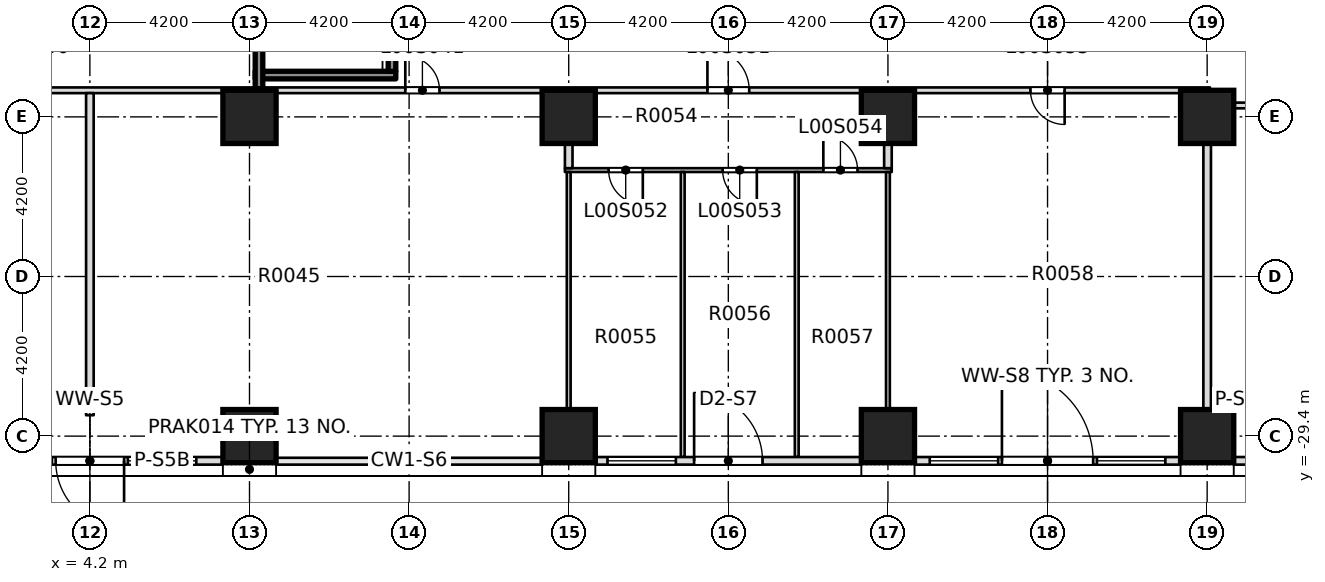
"""IFC4 building model, lengths in metres.
Left out: names, types, materials, properties, quantities, classifications, styles, units other than length and angle.
Written with IfcOpenShell. Run it as: python <this file> out.ifc"""

import sys

from ifc_helpers import new_model, si_unit, direction, frame, frame_2d, origin, origin_2d, place, context, subcontext, project, spatial, rectangle, extrude, element, fill, save


model = new_model("IFC4")
c1 = context("Model", 3, precision=1e-05, world=origin(), true_north=direction((0.0, 1.0)))
c2 = subcontext(c1, "Body", "Model", "MODEL_VIEW")
j1 = project(units=[si_unit("LENGTHUNIT", "METRE"), si_unit("PLANEANGLEUNIT", "RADIAN")], contexts=[c1])
p1 = place(None, origin())
s1 = spatial("IfcSite", under=j1, at=p1, CompositionType="ELEMENT")
p2 = place(p1, origin())
s2 = spatial("IfcBuilding", under=s1, at=p2, CompositionType="ELEMENT")
p3 = place(p2, origin())
s3 = spatial("IfcBuildingStorey", under=s2, at=p3, CompositionType="ELEMENT", Elevation=0.0)
for number, where, z_axis, x_axis in (
    (1, (8.4, -21.0, -0.45), (0.0, 0.0, 1.0), (1.0, 0.0, 0.0)),
    (2, (16.8, -21.0, -0.45), (0.0, 0.0, 1.0), (1.0, 0.0, 0.0)),
):
    element("IfcColumn", number, at=place(p3, frame(where, z_axis=z_axis, x_axis=x_axis)), inside=s3, PredefinedType="COLUMN", context=c2, shape_type="SweptSolid", body=[
        extrude(rectangle(XDim=1.4, YDim=1.4, at=origin_2d()), origin(), (0.0, 0.0, 1.0), 7.55),
    ])
for number, where, z_axis, x_axis in (
    (3, (8.4, -29.4, 0.0), (0.0, 0.0, 1.0), (1.0, 0.0, 0.0)),
    (4, (16.8, -29.4, 0.0), (0.0, 0.0, 1.0), (1.0, 0.0, 0.0)),
    (5, (25.2, -29.4, 0.0), (0.0, 0.0, 1.0), (1.0, 0.0, 0.0)),
    (6, (33.6, -29.4, 0.0), (0.0, 0.0, 1.0), (1.0, 0.0, 0.0)),
    (7, (25.2, -21.0, 0.0), (0.0, 0.0, 1.0), (1.0, 0.0, 0.0)),
    (8, (33.6, -21.0, 0.0), (0.0, 0.0, 1.0), (1.0, 0.0, 0.0)),
):
    element("IfcColumn", number, at=place(p3, frame(where, z_axis=z_axis, x_axis=x_axis)), inside=s3, PredefinedType="COLUMN", context=c2, shape_type="SweptSolid", body=[
        extrude(rectangle(XDim=1.4, YDim=1.4, at=origin_2d()), origin(), (0.0, 0.0, 1.0), 7.5),
    ])
p4 = place(p3, frame((16.7, -22.4, 0.0), z_axis=(0.0, 0.0, 1.0), x_axis=(1.0, 0.0, 0.0)))
e9 = element("IfcWall", 9, at=p4, inside=s3, PredefinedType="PARTITIONING", context=c2, shape_type="SweptSolid", body=[
    extrude(rectangle(XDim=8.6, YDim=0.1, at=frame_2d((4.3, 0.0))), origin(), (0.0, 0.0, 1.0), 7.1),
])
p5 = place(p4, frame((1.15, 0.0, 0.0)))
e10 = element("IfcOpeningElement", 10, at=p5, cuts=e9, PredefinedType="OPENING", context=c2, shape_type="SweptSolid", body=[
    extrude(rectangle(XDim=0.9, YDim=2.1, at=frame_2d((0.45, 1.05))), frame((0.0, 0.06, 0.0), z_axis=(0.0, -1.0, 0.0), x_axis=(1.0, 0.0, 0.0)), (0.0, 0.0, 1.0), 0.12),
])
p6 = place(p4, frame((4.15, 0.0, 0.0)))
e11 = element("IfcOpeningElement", 11, at=p6, cuts=e9, PredefinedType="OPENING", context=c2, shape_type="SweptSolid", body=[
    extrude(rectangle(XDim=0.9, YDim=2.1, at=frame_2d((0.45, 1.05))), frame((0.0, 0.06, 0.0), z_axis=(0.0, -1.0, 0.0), x_axis=(1.0, 0.0, 0.0)), (0.0, 0.0, 1.0), 0.12),
])
p7 = place(p4, frame((6.8, 0.0, 0.0)))
e12 = element("IfcOpeningElement", 12, at=p7, cuts=e9, PredefinedType="OPENING", context=c2, shape_type="SweptSolid", body=[
    extrude(rectangle(XDim=0.9, YDim=2.1, at=frame_2d((0.45, 1.05))), frame((0.0, 0.06, 0.0), z_axis=(0.0, -1.0, 0.0), x_axis=(1.0, 0.0, 0.0)), (0.0, 0.0, 1.0), 0.12),
])
p8 = place(p3, frame((33.5, -20.7, 0.0), z_axis=(0.0, 0.0, 1.0), x_axis=(1.0, 0.0, 0.0)))
e13 = element("IfcWall", 13, at=p8, inside=s3, PredefinedType="PARTITIONING", context=c2, shape_type="SweptSolid", body=[
    extrude(rectangle(XDim=16.975, YDim=0.15, at=frame_2d((8.488, 0.0))), origin(), (0.0, 0.0, 1.0), 7.1),
])
p9 = place(p8, frame((9.3, 0.0, 0.0)))
e14 = element("IfcOpeningElement", 14, at=p9, cuts=e13, PredefinedType="OPENING", context=c2, shape_type="SweptSolid", body=[
    extrude(rectangle(XDim=0.9, YDim=2.1, at=frame_2d((0.45, 1.05))), frame((0.0, 0.085, 0.0), z_axis=(0.0, -1.0, 0.0), x_axis=(1.0, 0.0, 0.0)), (0.0, 0.0, 1.0), 0.17),
])
p10 = place(p3, frame((-34.15, -20.3, 0.0), z_axis=(0.0, 0.0, 1.0), x_axis=(1.0, 0.0, 0.0)))
e15 = element("IfcWall", 15, at=p10, inside=s3, PredefinedType="PARTITIONING", context=c2, shape_type="SweptSolid", body=[
    extrude(rectangle(XDim=67.825, YDim=0.15, at=frame_2d((33.913, 0.0))), origin(), (0.0, 0.0, 1.0), 7.1),
])
p11 = place(p10, frame((12.6, 0.0, 0.0)))
e16 = element("IfcOpeningElement", 16, at=p11, cuts=e15, PredefinedType="OPENING", context=c2, shape_type="SweptSolid", body=[
    extrude(rectangle(XDim=1.1, YDim=2.1, at=frame_2d((0.55, 1.05))), frame((0.0, 0.085, 0.0), z_axis=(0.0, -1.0, 0.0), x_axis=(1.0, 0.0, 0.0)), (0.0, 0.0, 1.0), 0.17),
])
p12 = place(p10, frame((2.825, 0.0, 0.0)))
e17 = element("IfcOpeningElement", 17, at=p12, cuts=e15, PredefinedType="OPENING", context=c2, shape_type="SweptSolid", body=[
    extrude(rectangle(XDim=0.9, YDim=2.1, at=frame_2d((0.45, 1.05))), frame((0.0, 0.085, 0.0), z_axis=(0.0, -1.0, 0.0), x_axis=(1.0, 0.0, 0.0)), (0.0, 0.0, 1.0), 0.17),
])
p13 = place(p10, frame((7.25, 0.0, 0.0)))
e18 = element("IfcOpeningElement", 18, at=p13, cuts=e15, PredefinedType="OPENING", context=c2, shape_type="SweptSolid", body=[
    extrude(rectangle(XDim=0.9, YDim=2.1, at=frame_2d((0.45, 1.05))), frame((0.0, 0.085, 0.0), z_axis=(0.0, -1.0, 0.0), x_axis=(1.0, 0.0, 0.0)), (0.0, 0.0, 1.0), 0.17),
])
p14 = place(p10, frame((20.8, 0.0, 0.0)))
e19 = element("IfcOpeningElement", 19, at=p14, cuts=e15, PredefinedType="OPENING", context=c2, shape_type="SweptSolid", body=[
    extrude(rectangle(XDim=0.9, YDim=2.1, at=frame_2d((0.45, 1.05))), frame((0.0, 0.085, 0.0), z_axis=(0.0, -1.0, 0.0), x_axis=(1.0, 0.0, 0.0)), (0.0, 0.0, 1.0), 0.17),
])
p15 = place(p10, frame((27.4, 0.0, 0.0)))
e20 = element("IfcOpeningElement", 20, at=p15, cuts=e15, PredefinedType="OPENING", context=c2, shape_type="SweptSolid", body=[
    extrude(rectangle(XDim=0.9, YDim=2.1, at=frame_2d((0.45, 1.05))), frame((0.0, 0.085, 0.0), z_axis=(0.0, -1.0, 0.0), x_axis=(1.0, 0.0, 0.0)), (0.0, 0.0, 1.0), 0.17),
])
p16 = place(p10, frame((36.25, 0.0, 0.0)))
e21 = element("IfcOpeningElement", 21, at=p16, cuts=e15, PredefinedType="OPENING", context=c2, shape_type="SweptSolid", body=[
    extrude(rectangle(XDim=0.9, YDim=2.1, at=frame_2d((0.45, 1.05))), frame((0.0, 0.085, 0.0), z_axis=(0.0, -1.0, 0.0), x_axis=(1.0, 0.0, 0.0)), (0.0, 0.0, 1.0), 0.17),
])
p17 = place(p10, frame((46.65, 0.0, 0.0)))
e22 = element("IfcOpeningElement", 22, at=p17, cuts=e15, PredefinedType="OPENING", context=c2, shape_type="SweptSolid", body=[
    extrude(rectangle(XDim=0.9, YDim=2.1, at=frame_2d((0.45, 1.05))), frame((0.0, 0.085, 0.0), z_axis=(0.0, -1.0, 0.0), x_axis=(1.0, 0.0, 0.0)), (0.0, 0.0, 1.0), 0.17),
])
p18 = place(p10, frame((54.6, 0.0, 0.0)))
e23 = element("IfcOpeningElement", 23, at=p18, cuts=e15, PredefinedType="OPENING", context=c2, shape_type="SweptSolid", body=[
    extrude(rectangle(XDim=1.1, YDim=2.1, at=frame_2d((0.55, 1.05))), frame((0.0, 0.085, 0.0), z_axis=(0.0, -1.0, 0.0), x_axis=(1.0, 0.0, 0.0)), (0.0, 0.0, 1.0), 0.17),
])
p19 = place(p10, frame((63.1, 0.0, 0.0)))
e24 = element("IfcOpeningElement", 24, at=p19, cuts=e15, PredefinedType="OPENING", context=c2, shape_type="SweptSolid", body=[
    extrude(rectangle(XDim=0.9, YDim=2.1, at=frame_2d((0.45, 1.05))), frame((0.0, 0.085, 0.0), z_axis=(0.0, -1.0, 0.0), x_axis=(1.0, 0.0, 0.0)), (0.0, 0.0, 1.0), 0.17),
])
p20 = place(p3, frame((4.2, -28.85, 0.0), z_axis=(0.0, 0.0, 1.0), x_axis=(0.0, 1.0, 0.0)))
e25 = element("IfcWall", 25, at=p20, inside=s3, PredefinedType="PARTITIONING", context=c2, shape_type="SweptSolid", body=[
    extrude(rectangle(XDim=8.475, YDim=0.2, at=frame_2d((4.238, 0.0))), origin(), (0.0, 0.0, 1.0), 7.1),
])
p21 = place(p3, frame((16.8, -29.95, 0.0), z_axis=(0.0, 0.0, 1.0), x_axis=(0.0, 1.0, 0.0)))
e26 = element("IfcWall", 26, at=p21, inside=s3, PredefinedType="PARTITIONING", context=c2, shape_type="SweptSolid", body=[
    extrude(rectangle(XDim=7.5, YDim=0.1, at=frame_2d((3.75, 0.0))), origin(), (0.0, 0.0, 1.0), 7.1),
])
p22 = place(p3, frame((16.8, -22.35, 0.0), z_axis=(0.0, 0.0, 1.0), x_axis=(0.0, 1.0, 0.0)))
e27 = element("IfcWall", 27, at=p22, inside=s3, PredefinedType="PARTITIONING", context=c2, shape_type="SweptSolid", body=[
    extrude(rectangle(XDim=1.975, YDim=0.2, at=frame_2d((0.988, 0.0))), origin(), (0.0, 0.0, 1.0), 7.1),
])
for number, where, z_axis, x_axis in (
    (28, (19.8, -29.95, 0.0), (0.0, 0.0, 1.0), (0.0, 1.0, 0.0)),
    (29, (22.8, -29.95, 0.0), (0.0, 0.0, 1.0), (0.0, 1.0, 0.0)),
    (30, (25.2, -29.95, 0.0), (0.0, 0.0, 1.0), (0.0, 1.0, 0.0)),
):
    element("IfcWall", number, at=place(p3, frame(where, z_axis=z_axis, x_axis=x_axis)), inside=s3, PredefinedType="PARTITIONING", context=c2, shape_type="SweptSolid", body=[
        extrude(rectangle(XDim=7.5, YDim=0.1, at=frame_2d((3.75, 0.0))), origin(), (0.0, 0.0, 1.0), 7.1),
    ])
p23 = place(p3, frame((25.2, -22.35, 0.0), z_axis=(0.0, 0.0, 1.0), x_axis=(0.0, 1.0, 0.0)))
e31 = element("IfcWall", 31, at=p23, inside=s3, PredefinedType="PARTITIONING", context=c2, shape_type="SweptSolid", body=[
    extrude(rectangle(XDim=1.975, YDim=0.2, at=frame_2d((0.988, 0.0))), origin(), (0.0, 0.0, 1.0), 7.1),
])
p24 = place(p3, frame((33.6, -29.95, 0.0), z_axis=(0.0, 0.0, 1.0), x_axis=(0.0, 1.0, 0.0)))
e32 = element("IfcWall", 32, at=p24, inside=s3, PredefinedType="PARTITIONING", context=c2, shape_type="SweptSolid", body=[
    extrude(rectangle(XDim=9.175, YDim=0.2, at=frame_2d((4.587, 0.0))), origin(), (0.0, 0.0, 1.0), 7.1),
])
p25 = place(p3, frame((33.6, -20.625, 0.0), z_axis=(0.0, 0.0, 1.0), x_axis=(0.0, 1.0, 0.0)))
e33 = element("IfcWall", 33, at=p25, inside=s3, PredefinedType="PARTITIONING", context=c2, shape_type="SweptSolid", body=[
    extrude(rectangle(XDim=0.25, YDim=0.15, at=frame_2d((0.125, 0.0))), origin(), (0.0, 0.0, 1.0), 7.1),
])
p26 = place(p3, frame((7.7, -30.05, 0.0), z_axis=(0.0, 0.0, 1.0), x_axis=(-1.0, 0.0, 0.0)))
e34 = element("IfcWall", 34, at=p26, inside=s3, PredefinedType="STANDARD", context=c2, shape_type="SweptSolid", body=[
    extrude(rectangle(XDim=7.0, YDim=0.2, at=frame_2d((3.5, 0.0))), origin(), (0.0, 0.0, 1.0), 7.1),
])
p27 = place(p26, frame((4.5, 0.0, 0.3)))
e35 = element("IfcOpeningElement", 35, at=p27, cuts=e34, PredefinedType="OPENING", context=c2, shape_type="SweptSolid", body=[
    extrude(rectangle(XDim=1.8, YDim=4.2, at=frame_2d((0.9, 2.1))), frame((0.0, 0.11, 0.0), z_axis=(0.0, -1.0, 0.0), x_axis=(1.0, 0.0, 0.0)), (0.0, 0.0, 1.0), 0.22),
])
p28 = place(p26, frame((2.6, 0.0, 0.0)))
e36 = element("IfcOpeningElement", 36, at=p28, cuts=e34, PredefinedType="OPENING", context=c2, shape_type="SweptSolid", body=[
    extrude(rectangle(XDim=1.8, YDim=2.4, at=frame_2d((0.9, 1.2))), frame((0.0, 0.11, 0.0), z_axis=(0.0, -1.0, 0.0), x_axis=(1.0, 0.0, 0.0)), (0.0, 0.0, 1.0), 0.22),
])
p29 = place(p26, frame((0.7, 0.0, 0.3)))
e37 = element("IfcOpeningElement", 37, at=p29, cuts=e34, PredefinedType="OPENING", context=c2, shape_type="SweptSolid", body=[
    extrude(rectangle(XDim=1.8, YDim=4.2, at=frame_2d((0.9, 2.1))), frame((0.0, 0.11, 0.0), z_axis=(0.0, -1.0, 0.0), x_axis=(1.0, 0.0, 0.0)), (0.0, 0.0, 1.0), 0.22),
])
p30 = place(p3, frame((24.5, -30.05, 0.0), z_axis=(0.0, 0.0, 1.0), x_axis=(-1.0, 0.0, 0.0)))
e38 = element("IfcWall", 38, at=p30, inside=s3, PredefinedType="STANDARD", context=c2, shape_type="SweptSolid", body=[
    extrude(rectangle(XDim=7.0, YDim=0.2, at=frame_2d((3.5, 0.0))), origin(), (0.0, 0.0, 1.0), 7.1),
])
p31 = place(p30, frame((4.88, 0.0, 0.3)))
e39 = element("IfcOpeningElement", 39, at=p31, cuts=e38, PredefinedType="OPENING", context=c2, shape_type="SweptSolid", body=[
    extrude(rectangle(XDim=1.8, YDim=4.2, at=frame_2d((0.9, 2.1))), frame((0.0, 0.11, 0.0), z_axis=(0.0, -1.0, 0.0), x_axis=(1.0, 0.0, 0.0)), (0.0, 0.0, 1.0), 0.22),
])
p32 = place(p30, frame((2.6, 0.0, 0.0)))
e40 = element("IfcOpeningElement", 40, at=p32, cuts=e38, PredefinedType="OPENING", context=c2, shape_type="SweptSolid", body=[
    extrude(rectangle(XDim=1.8, YDim=2.4, at=frame_2d((0.9, 1.2))), frame((0.0, 0.11, 0.0), z_axis=(0.0, -1.0, 0.0), x_axis=(1.0, 0.0, 0.0)), (0.0, 0.0, 1.0), 0.22),
])
p33 = place(p3, frame((32.9, -30.05, 0.0), z_axis=(0.0, 0.0, 1.0), x_axis=(-1.0, 0.0, 0.0)))
e41 = element("IfcWall", 41, at=p33, inside=s3, PredefinedType="STANDARD", context=c2, shape_type="SweptSolid", body=[
    extrude(rectangle(XDim=7.0, YDim=0.2, at=frame_2d((3.5, 0.0))), origin(), (0.0, 0.0, 1.0), 7.1),
])
p34 = place(p33, frame((4.8, 0.0, 0.3)))
e42 = element("IfcOpeningElement", 42, at=p34, cuts=e41, PredefinedType="OPENING", context=c2, shape_type="SweptSolid", body=[
    extrude(rectangle(XDim=1.8, YDim=4.2, at=frame_2d((0.9, 2.1))), frame((0.0, 0.11, 0.0), z_axis=(0.0, -1.0, 0.0), x_axis=(1.0, 0.0, 0.0)), (0.0, 0.0, 1.0), 0.22),
])
p35 = place(p33, frame((2.3, 0.0, 0.0)))
e43 = element("IfcOpeningElement", 43, at=p35, cuts=e41, PredefinedType="OPENING", context=c2, shape_type="SweptSolid", body=[
    extrude(rectangle(XDim=2.4, YDim=2.4, at=frame_2d((1.2, 1.2))), frame((0.0, 0.11, 0.0), z_axis=(0.0, -1.0, 0.0), x_axis=(1.0, 0.0, 0.0)), (0.0, 0.0, 1.0), 0.22),
])
p36 = place(p33, frame((0.4, 0.0, 0.3)))
e44 = element("IfcOpeningElement", 44, at=p36, cuts=e41, PredefinedType="OPENING", context=c2, shape_type="SweptSolid", body=[
    extrude(rectangle(XDim=1.8, YDim=4.2, at=frame_2d((0.9, 2.1))), frame((0.0, 0.11, 0.0), z_axis=(0.0, -1.0, 0.0), x_axis=(1.0, 0.0, 0.0)), (0.0, 0.0, 1.0), 0.22),
])
p37 = place(p3, frame((41.3, -30.05, 0.0), z_axis=(0.0, 0.0, 1.0), x_axis=(-1.0, 0.0, 0.0)))
e45 = element("IfcWall", 45, at=p37, inside=s3, PredefinedType="STANDARD", context=c2, shape_type="SweptSolid", body=[
    extrude(rectangle(XDim=7.0, YDim=0.2, at=frame_2d((3.5, 0.0))), origin(), (0.0, 0.0, 1.0), 7.1),
])
p38 = place(p37, frame((4.5, 0.0, 0.3)))
e46 = element("IfcOpeningElement", 46, at=p38, cuts=e45, PredefinedType="OPENING", context=c2, shape_type="SweptSolid", body=[
    extrude(rectangle(XDim=1.8, YDim=4.2, at=frame_2d((0.9, 2.1))), frame((0.0, 0.11, 0.0), z_axis=(0.0, -1.0, 0.0), x_axis=(1.0, 0.0, 0.0)), (0.0, 0.0, 1.0), 0.22),
])
p39 = place(p37, frame((2.6, 0.0, 0.0)))
e47 = element("IfcOpeningElement", 47, at=p39, cuts=e45, PredefinedType="OPENING", context=c2, shape_type="SweptSolid", body=[
    extrude(rectangle(XDim=1.8, YDim=2.4, at=frame_2d((0.9, 1.2))), frame((0.0, 0.11, 0.0), z_axis=(0.0, -1.0, 0.0), x_axis=(1.0, 0.0, 0.0)), (0.0, 0.0, 1.0), 0.22),
])
p40 = place(p37, frame((0.7, 0.0, 0.3)))
e48 = element("IfcOpeningElement", 48, at=p40, cuts=e45, PredefinedType="OPENING", context=c2, shape_type="SweptSolid", body=[
    extrude(rectangle(XDim=1.8, YDim=4.2, at=frame_2d((0.9, 2.1))), frame((0.0, 0.11, 0.0), z_axis=(0.0, -1.0, 0.0), x_axis=(1.0, 0.0, 0.0)), (0.0, 0.0, 1.0), 0.22),
])
p41 = place(p3, frame((8.55, -19.9, 0.0), z_axis=(0.0, 0.0, 1.0), x_axis=(1.0, 0.0, 0.0)))
e49 = element("IfcWall", 49, at=p41, inside=s3, PredefinedType="SOLIDWALL", context=c2, shape_type="SweptSolid", body=[
    extrude(rectangle(XDim=3.7, YDim=0.2, at=frame_2d((1.85, 0.0))), origin(), (0.0, 0.0, 1.0), 7.1),
])
p42 = place(p3, frame((8.65, -20.3, 0.0), z_axis=(0.0, 0.0, 1.0), x_axis=(0.0, 1.0, 0.0)))
e50 = element("IfcWall", 50, at=p42, inside=s3, PredefinedType="SOLIDWALL", context=c2, shape_type="SweptSolid", body=[
    extrude(rectangle(XDim=7.1, YDim=0.2, at=frame_2d((3.55, 0.0))), origin(), (0.0, 0.0, 1.0), 7.1),
])
p43 = place(p3, frame((12.15, -19.8, 0.0), z_axis=(0.0, 0.0, 1.0), x_axis=(0.0, 1.0, 0.0)))
e51 = element("IfcWall", 51, at=p43, inside=s3, PredefinedType="SOLIDWALL", context=c2, shape_type="SweptSolid", body=[
    extrude(rectangle(XDim=6.6, YDim=0.2, at=frame_2d((3.3, 0.0))), origin(), (0.0, 0.0, 1.0), 7.1),
])
p44 = place(p17, origin())
e52 = element("IfcDoor", 52, at=p44, inside=s3, OperationType="SINGLE_SWING_LEFT", PredefinedType="DOOR", context=c2, shape_type="SweptSolid", body=[
    extrude(rectangle(XDim=0.9, YDim=2.1, at=frame_2d((0.45, 1.05))), frame((0.0, 0.025, 0.0), z_axis=(0.0, -1.0, 0.0), x_axis=(1.0, 0.0, 0.0)), (0.0, 0.0, 1.0), 0.05),
])
fill(e22, e52)
p45 = place(p18, origin())
e53 = element("IfcDoor", 53, at=p45, inside=s3, OperationType="SINGLE_SWING_RIGHT", PredefinedType="DOOR", context=c2, shape_type="SweptSolid", body=[
    extrude(rectangle(XDim=1.1, YDim=2.1, at=frame_2d((0.55, 1.05))), frame((0.0, 0.025, 0.0), z_axis=(0.0, -1.0, 0.0), x_axis=(1.0, 0.0, 0.0)), (0.0, 0.0, 1.0), 0.05),
])
fill(e23, e53)
p46 = place(p5, origin())
e54 = element("IfcDoor", 54, at=p46, inside=s3, OperationType="SINGLE_SWING_RIGHT", PredefinedType="DOOR", context=c2, shape_type="SweptSolid", body=[
    extrude(rectangle(XDim=0.9, YDim=2.1, at=frame_2d((0.45, 1.05))), frame((0.0, 0.025, 0.0), z_axis=(0.0, -1.0, 0.0), x_axis=(1.0, 0.0, 0.0)), (0.0, 0.0, 1.0), 0.05),
])
fill(e10, e54)
p47 = place(p6, origin())
e55 = element("IfcDoor", 55, at=p47, inside=s3, OperationType="SINGLE_SWING_RIGHT", PredefinedType="DOOR", context=c2, shape_type="SweptSolid", body=[
    extrude(rectangle(XDim=0.9, YDim=2.1, at=frame_2d((0.45, 1.05))), frame((0.0, 0.025, 0.0), z_axis=(0.0, -1.0, 0.0), x_axis=(1.0, 0.0, 0.0)), (0.0, 0.0, 1.0), 0.05),
])
fill(e11, e55)
p48 = place(p7, origin())
e56 = element("IfcDoor", 56, at=p48, inside=s3, OperationType="SINGLE_SWING_RIGHT", PredefinedType="DOOR", context=c2, shape_type="SweptSolid", body=[
    extrude(rectangle(XDim=0.9, YDim=2.1, at=frame_2d((0.45, 1.05))), frame((0.0, 0.025, 0.0), z_axis=(0.0, -1.0, 0.0), x_axis=(1.0, 0.0, 0.0)), (0.0, 0.0, 1.0), 0.05),
])
fill(e12, e56)
p49 = place(p19, origin())
e57 = element("IfcDoor", 57, at=p49, inside=s3, OperationType="SINGLE_SWING_RIGHT", PredefinedType="DOOR", context=c2, shape_type="SweptSolid", body=[
    extrude(rectangle(XDim=0.9, YDim=2.1, at=frame_2d((0.45, 1.05))), frame((0.0, 0.025, 0.0), z_axis=(0.0, -1.0, 0.0), x_axis=(1.0, 0.0, 0.0)), (0.0, 0.0, 1.0), 0.05),
])
fill(e24, e57)
p50 = place(p27, origin())
e58 = element("IfcWindow", 58, at=p50, inside=s3, PartitioningType="SINGLE_PANEL", PredefinedType="WINDOW", context=c2, shape_type="SweptSolid", body=[
    extrude(rectangle(XDim=1.8, YDim=4.2, at=frame_2d((0.9, 2.1))), frame((0.0, 0.03, 0.0), z_axis=(0.0, -1.0, 0.0), x_axis=(1.0, 0.0, 0.0)), (0.0, 0.0, 1.0), 0.06),
])
fill(e35, e58)
p51 = place(p28, origin())
e59 = element("IfcDoor", 59, at=p51, inside=s3, OperationType="SINGLE_SWING_LEFT", PredefinedType="DOOR", context=c2, shape_type="SweptSolid", body=[
    extrude(rectangle(XDim=1.8, YDim=2.4, at=frame_2d((0.9, 1.2))), frame((0.0, 0.025, 0.0), z_axis=(0.0, -1.0, 0.0), x_axis=(1.0, 0.0, 0.0)), (0.0, 0.0, 1.0), 0.05),
])
fill(e36, e59)
p52 = place(p29, origin())
e60 = element("IfcWindow", 60, at=p52, inside=s3, PartitioningType="SINGLE_PANEL", PredefinedType="WINDOW", context=c2, shape_type="SweptSolid", body=[
    extrude(rectangle(XDim=1.8, YDim=4.2, at=frame_2d((0.9, 2.1))), frame((0.0, 0.03, 0.0), z_axis=(0.0, -1.0, 0.0), x_axis=(1.0, 0.0, 0.0)), (0.0, 0.0, 1.0), 0.06),
])
fill(e37, e60)
p53 = place(p31, origin())
e61 = element("IfcWindow", 61, at=p53, inside=s3, PartitioningType="SINGLE_PANEL", PredefinedType="WINDOW", context=c2, shape_type="SweptSolid", body=[
    extrude(rectangle(XDim=1.8, YDim=4.2, at=frame_2d((0.9, 2.1))), frame((0.0, 0.03, 0.0), z_axis=(0.0, -1.0, 0.0), x_axis=(1.0, 0.0, 0.0)), (0.0, 0.0, 1.0), 0.06),
])
fill(e39, e61)
p54 = place(p32, origin())
e62 = element("IfcDoor", 62, at=p54, inside=s3, OperationType="SINGLE_SWING_LEFT", PredefinedType="DOOR", context=c2, shape_type="SweptSolid", body=[
    extrude(rectangle(XDim=1.8, YDim=2.4, at=frame_2d((0.9, 1.2))), frame((0.0, 0.025, 0.0), z_axis=(0.0, -1.0, 0.0), x_axis=(1.0, 0.0, 0.0)), (0.0, 0.0, 1.0), 0.05),
])
fill(e40, e62)
p55 = place(p34, origin())
e63 = element("IfcWindow", 63, at=p55, inside=s3, PartitioningType="SINGLE_PANEL", PredefinedType="WINDOW", context=c2, shape_type="SweptSolid", body=[
    extrude(rectangle(XDim=1.8, YDim=4.2, at=frame_2d((0.9, 2.1))), frame((0.0, 0.03, 0.0), z_axis=(0.0, -1.0, 0.0), x_axis=(1.0, 0.0, 0.0)), (0.0, 0.0, 1.0), 0.06),
])
fill(e42, e63)
p56 = place(p35, origin())
e64 = element("IfcDoor", 64, at=p56, inside=s3, OperationType="SINGLE_SWING_LEFT", PredefinedType="DOOR", context=c2, shape_type="SweptSolid", body=[
    extrude(rectangle(XDim=2.4, YDim=2.4, at=frame_2d((1.2, 1.2))), frame((0.0, 0.025, 0.0), z_axis=(0.0, -1.0, 0.0), x_axis=(1.0, 0.0, 0.0)), (0.0, 0.0, 1.0), 0.05),
])
fill(e43, e64)
p57 = place(p36, origin())
e65 = element("IfcWindow", 65, at=p57, inside=s3, PartitioningType="SINGLE_PANEL", PredefinedType="WINDOW", context=c2, shape_type="SweptSolid", body=[
    extrude(rectangle(XDim=1.8, YDim=4.2, at=frame_2d((0.9, 2.1))), frame((0.0, 0.03, 0.0), z_axis=(0.0, -1.0, 0.0), x_axis=(1.0, 0.0, 0.0)), (0.0, 0.0, 1.0), 0.06),
])
fill(e44, e65)
save(model, sys.argv[1])
